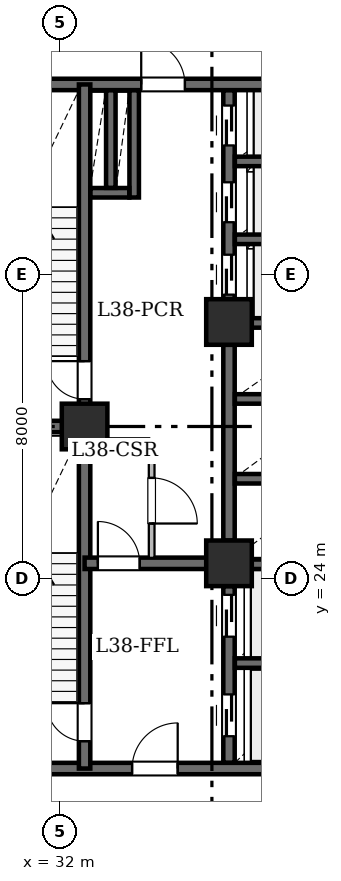
"""IFC4 building model, lengths in metres.
Left out: names, types, materials, properties, quantities, classifications, styles, units other than length and angle.
Written with IfcOpenShell. Run it as: python <this file> out.ifc"""

import sys

from ifc_helpers import new_model, si_unit, direction, frame, frame_2d, origin, origin_2d, place, context, subcontext, project, spatial, rectangle, hollow_rectangle, extrude, element, fill, save


model = new_model("IFC4")
c1 = context("Model", 3, precision=1e-05, world=origin(), true_north=direction((0.0, 1.0)))
c2 = subcontext(c1, "Body", "Model", "MODEL_VIEW")
j1 = project(units=[si_unit("LENGTHUNIT", "METRE"), si_unit("PLANEANGLEUNIT", "RADIAN")], contexts=[c1])
p1 = place(None, origin())
s1 = spatial("IfcSite", under=j1, at=p1, CompositionType="ELEMENT")
p2 = place(p1, origin())
s2 = spatial("IfcBuilding", under=s1, at=p2, CompositionType="ELEMENT")
p3 = place(p2, frame((0.0, 0.0, 150.5)))
s3 = spatial("IfcBuildingStorey", under=s2, at=p3, CompositionType="ELEMENT", Elevation=150.5)
for number, where, z_axis, x_axis in (
    (1, (32.65, 28.0, 0.0), (0.0, 0.0, 1.0), (1.0, 0.0, 0.0)),
    (2, (36.45, 24.4, 0.0), (0.0, 0.0, 1.0), (1.0, 0.0, 0.0)),
    (3, (36.45, 30.75, 0.0), (0.0, 0.0, 1.0), (1.0, 0.0, 0.0)),
):
    element("IfcColumn", number, at=place(p3, frame(where, z_axis=z_axis, x_axis=x_axis)), inside=s3, PredefinedType="COLUMN", context=c2, shape_type="SweptSolid", body=[
        extrude(hollow_rectangle(XDim=1.2, YDim=1.2, WallThickness=0.06, at=origin_2d()), origin(), (0.0, 0.0, 1.0), 5.375),
    ])
p4 = place(p3, frame((29.0, 19.0, 0.0), z_axis=(0.0, 0.0, 1.0), x_axis=(1.0, 0.0, 0.0)))
e4 = element("IfcWall", 4, at=p4, inside=s3, PredefinedType="SHEAR", context=c2, shape_type="SweptSolid", body=[
    extrude(rectangle(XDim=10.4, YDim=0.3, at=frame_2d((5.2, 0.0))), origin(), (0.0, 0.0, 1.0), 4.98),
])
p5 = place(p4, frame((4.9, 0.0, 0.0)))
e5 = element("IfcOpeningElement", 5, at=p5, cuts=e4, PredefinedType="OPENING", context=c2, shape_type="SweptSolid", body=[
    extrude(rectangle(XDim=1.2, YDim=2.15, at=frame_2d((0.6, 1.075))), frame((0.0, 0.16, 0.0), z_axis=(0.0, -1.0, 0.0), x_axis=(1.0, 0.0, 0.0)), (0.0, 0.0, 1.0), 0.32),
])
p6 = place(p3, frame((29.0, 37.0, 0.0), z_axis=(0.0, 0.0, 1.0), x_axis=(1.0, 0.0, 0.0)))
e6 = element("IfcWall", 6, at=p6, inside=s3, PredefinedType="SHEAR", context=c2, shape_type="SweptSolid", body=[
    extrude(rectangle(XDim=10.4, YDim=0.3, at=frame_2d((5.2, 0.0))), origin(), (0.0, 0.0, 1.0), 4.98),
])
p7 = place(p6, frame((5.14, 0.0, 0.0)))
e7 = element("IfcOpeningElement", 7, at=p7, cuts=e6, PredefinedType="OPENING", context=c2, shape_type="SweptSolid", body=[
    extrude(rectangle(XDim=1.15, YDim=2.2, at=frame_2d((0.575, 1.1))), frame((0.0, 0.16, 0.0), z_axis=(0.0, -1.0, 0.0), x_axis=(1.0, 0.0, 0.0)), (0.0, 0.0, 1.0), 0.32),
])
p8 = place(p3, frame((32.65, 19.0, 0.0), z_axis=(0.0, 0.0, 1.0), x_axis=(0.0, 1.0, 0.0)))
e8 = element("IfcWall", 8, at=p8, inside=s3, PredefinedType="SHEAR", context=c2, shape_type="SweptSolid", body=[
    extrude(rectangle(XDim=9.0, YDim=0.3, at=frame_2d((4.5, 0.0))), origin(), (0.0, 0.0, 1.0), 4.98),
])
p9 = place(p8, frame((0.72, 0.0, 0.0)))
e9 = element("IfcOpeningElement", 9, at=p9, cuts=e8, PredefinedType="OPENING", context=c2, shape_type="SweptSolid", body=[
    extrude(rectangle(XDim=1.0, YDim=2.15, at=frame_2d((0.5, 1.075))), frame((0.0, 0.16, 0.0), z_axis=(0.0, -1.0, 0.0), x_axis=(1.0, 0.0, 0.0)), (0.0, 0.0, 1.0), 0.32),
])
p10 = place(p3, frame((32.65, 28.0, 0.0), z_axis=(0.0, 0.0, 1.0), x_axis=(0.0, 1.0, 0.0)))
e10 = element("IfcWall", 10, at=p10, inside=s3, PredefinedType="SHEAR", context=c2, shape_type="SweptSolid", body=[
    extrude(rectangle(XDim=9.0, YDim=0.3, at=frame_2d((4.5, 0.0))), origin(), (0.0, 0.0, 1.0), 4.98),
])
p11 = place(p10, frame((0.72, 0.0, 0.0)))
e11 = element("IfcOpeningElement", 11, at=p11, cuts=e10, PredefinedType="OPENING", context=c2, shape_type="SweptSolid", body=[
    extrude(rectangle(XDim=1.0, YDim=2.15, at=frame_2d((0.5, 1.075))), frame((0.0, 0.16, 0.0), z_axis=(0.0, -1.0, 0.0), x_axis=(1.0, 0.0, 0.0)), (0.0, 0.0, 1.0), 0.32),
])
p12 = place(p3, frame((29.0, 28.0, 0.0), z_axis=(0.0, 0.0, 1.0), x_axis=(1.0, 0.0, 0.0)))
e12 = element("IfcWall", 12, at=p12, inside=s3, PredefinedType="SHEAR", context=c2, shape_type="SweptSolid", body=[
    extrude(rectangle(XDim=3.65, YDim=0.3, at=frame_2d((1.825, 0.0))), origin(), (0.0, 0.0, 1.0), 4.98),
])
p13 = place(p3, frame((32.65, 24.4, 0.0), z_axis=(0.0, 0.0, 1.0), x_axis=(1.0, 0.0, 0.0)))
e13 = element("IfcWall", 13, at=p13, inside=s3, PredefinedType="SHEAR", context=c2, shape_type="SweptSolid", body=[
    extrude(rectangle(XDim=3.8, YDim=0.3, at=frame_2d((1.9, 0.0))), origin(), (0.0, 0.0, 1.0), 4.98),
])
p14 = place(p13, frame((0.35, 0.0, 0.0)))
e14 = element("IfcOpeningElement", 14, at=p14, cuts=e13, PredefinedType="OPENING", context=c2, shape_type="SweptSolid", body=[
    extrude(rectangle(XDim=1.1, YDim=2.15, at=frame_2d((0.55, 1.075))), frame((0.0, 0.16, 0.0), z_axis=(0.0, -1.0, 0.0), x_axis=(1.0, 0.0, 0.0)), (0.0, 0.0, 1.0), 0.32),
])
p15 = place(p3, frame((36.45, 19.154, 0.0), z_axis=(0.0, 0.0, 1.0), x_axis=(0.0, 1.0, 0.0)))
e15 = element("IfcWall", 15, at=p15, inside=s3, PredefinedType="SHEAR", context=c2, shape_type="SweptSolid", body=[
    extrude(rectangle(XDim=4.646, YDim=0.3, at=frame_2d((2.323, 0.0))), origin(), (0.0, 0.0, 1.0), 4.98),
])
p16 = place(p15, frame((0.696, 0.0, 0.0)))
e16 = element("IfcOpeningElement", 16, at=p16, cuts=e15, PredefinedType="OPENING", context=c2, shape_type="SweptSolid", body=[
    extrude(rectangle(XDim=1.1, YDim=2.15, at=frame_2d((0.55, 1.075))), frame((0.0, 0.16, 0.0), z_axis=(0.0, -1.0, 0.0), x_axis=(1.0, 0.0, 0.0)), (0.0, 0.0, 1.0), 0.32),
])
p17 = place(p15, frame((3.316, 0.0, 0.0)))
e17 = element("IfcOpeningElement", 17, at=p17, cuts=e15, PredefinedType="OPENING", context=c2, shape_type="SweptSolid", body=[
    extrude(rectangle(XDim=1.1, YDim=2.15, at=frame_2d((0.55, 1.075))), frame((0.0, 0.16, 0.0), z_axis=(0.0, -1.0, 0.0), x_axis=(1.0, 0.0, 0.0)), (0.0, 0.0, 1.0), 0.32),
])
p18 = place(p3, frame((36.45, 25.0, 0.0), z_axis=(0.0, 0.0, 1.0), x_axis=(0.0, 1.0, 0.0)))
e18 = element("IfcWall", 18, at=p18, inside=s3, PredefinedType="SHEAR", context=c2, shape_type="SweptSolid", body=[
    extrude(rectangle(XDim=5.15, YDim=0.3, at=frame_2d((2.575, 0.0))), origin(), (0.0, 0.0, 1.0), 4.98),
])
p19 = place(p3, frame((36.45, 31.35, 0.0), z_axis=(0.0, 0.0, 1.0), x_axis=(0.0, 1.0, 0.0)))
e19 = element("IfcWall", 19, at=p19, inside=s3, PredefinedType="SHEAR", context=c2, shape_type="SweptSolid", body=[
    extrude(rectangle(XDim=5.496, YDim=0.3, at=frame_2d((2.748, 0.0))), origin(), (0.0, 0.0, 1.0), 4.98),
])
p20 = place(p19, frame((0.12, 0.0, 0.0)))
e20 = element("IfcOpeningElement", 20, at=p20, cuts=e19, PredefinedType="OPENING", context=c2, shape_type="SweptSolid", body=[
    extrude(rectangle(XDim=1.05, YDim=2.15, at=frame_2d((0.525, 1.075))), frame((0.0, 0.16, 0.0), z_axis=(0.0, -1.0, 0.0), x_axis=(1.0, 0.0, 0.0)), (0.0, 0.0, 1.0), 0.32),
])
p21 = place(p19, frame((2.025, 0.0, 0.0)))
e21 = element("IfcOpeningElement", 21, at=p21, cuts=e19, PredefinedType="OPENING", context=c2, shape_type="SweptSolid", body=[
    extrude(rectangle(XDim=1.05, YDim=2.15, at=frame_2d((0.525, 1.075))), frame((0.0, 0.16, 0.0), z_axis=(0.0, -1.0, 0.0), x_axis=(1.0, 0.0, 0.0)), (0.0, 0.0, 1.0), 0.32),
])
p22 = place(p19, frame((4.045, 0.0, 0.0)))
e22 = element("IfcOpeningElement", 22, at=p22, cuts=e19, PredefinedType="OPENING", context=c2, shape_type="SweptSolid", body=[
    extrude(rectangle(XDim=1.05, YDim=2.15, at=frame_2d((0.525, 1.075))), frame((0.0, 0.16, 0.0), z_axis=(0.0, -1.0, 0.0), x_axis=(1.0, 0.0, 0.0)), (0.0, 0.0, 1.0), 0.32),
])
for number, where, z_axis, x_axis in (
    (23, (36.604, 21.775, 0.0), (0.0, 0.0, 1.0), (1.0, 0.0, 0.0)),
    (24, (36.604, 24.375, 0.0), (0.0, 0.0, 1.0), (1.0, 0.0, 0.0)),
    (25, (36.604, 26.625, 0.0), (0.0, 0.0, 1.0), (1.0, 0.0, 0.0)),
    (26, (36.604, 28.725, 0.0), (0.0, 0.0, 1.0), (1.0, 0.0, 0.0)),
    (27, (36.604, 30.725, 0.0), (0.0, 0.0, 1.0), (1.0, 0.0, 0.0)),
    (28, (36.604, 32.925, 0.0), (0.0, 0.0, 1.0), (1.0, 0.0, 0.0)),
    (29, (36.604, 34.975, 0.0), (0.0, 0.0, 1.0), (1.0, 0.0, 0.0)),
):
    element("IfcWall", number, at=place(p3, frame(where, z_axis=z_axis, x_axis=x_axis)), inside=s3, PredefinedType="SHEAR", context=c2, shape_type="SweptSolid", body=[
        extrude(rectangle(XDim=2.642, YDim=0.25, at=frame_2d((1.321, 0.0))), origin(), (0.0, 0.0, 1.0), 4.98),
    ])
p23 = place(p3, frame((33.955, 34.025, 0.0), z_axis=(0.0, 0.0, 1.0), x_axis=(0.0, 1.0, 0.0)))
e30 = element("IfcWall", 30, at=p23, inside=s3, PredefinedType="SHEAR", context=c2, shape_type="SweptSolid", body=[
    extrude(rectangle(XDim=2.821, YDim=0.25, at=frame_2d((1.411, 0.0))), origin(), (0.0, 0.0, 1.0), 4.98),
])
p24 = place(p3, frame((32.804, 34.15, 0.0), z_axis=(0.0, 0.0, 1.0), x_axis=(1.0, 0.0, 0.0)))
e31 = element("IfcWall", 31, at=p24, inside=s3, PredefinedType="SHEAR", context=c2, shape_type="SweptSolid", body=[
    extrude(rectangle(XDim=1.022, YDim=0.25, at=frame_2d((0.511, 0.0))), origin(), (0.0, 0.0, 1.0), 4.98),
])
p25 = place(p3, frame((33.34, 34.279, 0.0), z_axis=(0.0, 0.0, 1.0), x_axis=(0.0, 1.0, 0.0)))
e32 = element("IfcWall", 32, at=p25, inside=s3, PredefinedType="SHEAR", context=c2, shape_type="SweptSolid", body=[
    extrude(rectangle(XDim=2.567, YDim=0.25, at=frame_2d((1.283, 0.0))), origin(), (0.0, 0.0, 1.0), 4.98),
])
p26 = place(p3, frame((32.794, 27.615, 0.0), z_axis=(0.0, 0.0, 1.0), x_axis=(1.0, 0.0, 0.0)))
e33 = element("IfcWall", 33, at=p26, inside=s3, PredefinedType="STANDARD", context=c2, shape_type="SweptSolid", body=[
    extrude(rectangle(XDim=1.556, YDim=0.15, at=frame_2d((0.778, 0.0))), origin(), (0.0, 0.0, 1.0), 4.437),
])
p27 = place(p3, frame((34.415, 27.55, 0.0), z_axis=(0.0, 0.0, 1.0), x_axis=(0.0, -1.0, 0.0)))
e34 = element("IfcWall", 34, at=p27, inside=s3, PredefinedType="STANDARD", context=c2, shape_type="SweptSolid", body=[
    extrude(rectangle(XDim=3.006, YDim=0.15, at=frame_2d((1.503, 0.0))), origin(), (0.0, 0.0, 1.0), 4.98),
])
p28 = place(p27, frame((0.903, 0.0, 0.0)))
e35 = element("IfcOpeningElement", 35, at=p28, cuts=e34, PredefinedType="OPENING", context=c2, shape_type="SweptSolid", body=[
    extrude(rectangle(XDim=1.2, YDim=2.15, at=frame_2d((0.6, 1.075))), frame((0.0, 0.085, 0.0), z_axis=(0.0, -1.0, 0.0), x_axis=(1.0, 0.0, 0.0)), (0.0, 0.0, 1.0), 0.17),
])
p29 = place(p9, origin())
e36 = element("IfcDoor", 36, at=p29, inside=s3, OperationType="SINGLE_SWING_RIGHT", PredefinedType="DOOR", context=c2, shape_type="SweptSolid", body=[
    extrude(rectangle(XDim=1.0, YDim=2.15, at=frame_2d((0.5, 1.075))), frame((0.0, 0.025, 0.0), z_axis=(0.0, -1.0, 0.0), x_axis=(1.0, 0.0, 0.0)), (0.0, 0.0, 1.0), 0.05),
])
fill(e9, e36)
p30 = place(p11, origin())
e37 = element("IfcDoor", 37, at=p30, inside=s3, OperationType="SINGLE_SWING_RIGHT", PredefinedType="DOOR", context=c2, shape_type="SweptSolid", body=[
    extrude(rectangle(XDim=1.0, YDim=2.15, at=frame_2d((0.5, 1.075))), frame((0.0, 0.025, 0.0), z_axis=(0.0, -1.0, 0.0), x_axis=(1.0, 0.0, 0.0)), (0.0, 0.0, 1.0), 0.05),
])
fill(e11, e37)
p31 = place(p14, origin())
e38 = element("IfcDoor", 38, at=p31, inside=s3, OperationType="SINGLE_SWING_LEFT", PredefinedType="DOOR", context=c2, shape_type="SweptSolid", body=[
    extrude(rectangle(XDim=1.1, YDim=2.15, at=frame_2d((0.55, 1.075))), frame((0.0, 0.025, 0.0), z_axis=(0.0, -1.0, 0.0), x_axis=(1.0, 0.0, 0.0)), (0.0, 0.0, 1.0), 0.05),
])
fill(e14, e38)
p32 = place(p5, origin())
e39 = element("IfcDoor", 39, at=p32, inside=s3, OperationType="SINGLE_SWING_RIGHT", PredefinedType="DOOR", context=c2, shape_type="SweptSolid", body=[
    extrude(rectangle(XDim=1.2, YDim=2.15, at=frame_2d((0.6, 1.075))), frame((0.0, 0.025, 0.0), z_axis=(0.0, -1.0, 0.0), x_axis=(1.0, 0.0, 0.0)), (0.0, 0.0, 1.0), 0.05),
])
fill(e5, e39)
p33 = place(p7, origin())
e40 = element("IfcDoor", 40, at=p33, inside=s3, OperationType="SINGLE_SWING_LEFT", PredefinedType="DOOR", context=c2, shape_type="SweptSolid", body=[
    extrude(rectangle(XDim=1.15, YDim=2.2, at=frame_2d((0.575, 1.1))), frame((0.0, 0.025, 0.0), z_axis=(0.0, -1.0, 0.0), x_axis=(1.0, 0.0, 0.0)), (0.0, 0.0, 1.0), 0.05),
])
fill(e7, e40)
p34 = place(p16, origin())
e41 = element("IfcDoor", 41, at=p34, inside=s3, OperationType="SLIDING_TO_LEFT", PredefinedType="DOOR", context=c2, shape_type="SweptSolid", body=[
    extrude(rectangle(XDim=1.1, YDim=2.15, at=frame_2d((0.55, 1.075))), frame((0.0, 0.025, 0.0), z_axis=(0.0, -1.0, 0.0), x_axis=(1.0, 0.0, 0.0)), (0.0, 0.0, 1.0), 0.05),
])
fill(e16, e41)
p35 = place(p17, origin())
e42 = element("IfcDoor", 42, at=p35, inside=s3, OperationType="SLIDING_TO_LEFT", PredefinedType="DOOR", context=c2, shape_type="SweptSolid", body=[
    extrude(rectangle(XDim=1.1, YDim=2.15, at=frame_2d((0.55, 1.075))), frame((0.0, 0.025, 0.0), z_axis=(0.0, -1.0, 0.0), x_axis=(1.0, 0.0, 0.0)), (0.0, 0.0, 1.0), 0.05),
])
fill(e17, e42)
p36 = place(p20, origin())
e43 = element("IfcDoor", 43, at=p36, inside=s3, OperationType="SLIDING_TO_LEFT", PredefinedType="DOOR", context=c2, shape_type="SweptSolid", body=[
    extrude(rectangle(XDim=1.05, YDim=2.15, at=frame_2d((0.525, 1.075))), frame((0.0, 0.025, 0.0), z_axis=(0.0, -1.0, 0.0), x_axis=(1.0, 0.0, 0.0)), (0.0, 0.0, 1.0), 0.05),
])
fill(e20, e43)
p37 = place(p21, origin())
e44 = element("IfcDoor", 44, at=p37, inside=s3, OperationType="SLIDING_TO_LEFT", PredefinedType="DOOR", context=c2, shape_type="SweptSolid", body=[
    extrude(rectangle(XDim=1.05, YDim=2.15, at=frame_2d((0.525, 1.075))), frame((0.0, 0.025, 0.0), z_axis=(0.0, -1.0, 0.0), x_axis=(1.0, 0.0, 0.0)), (0.0, 0.0, 1.0), 0.05),
])
fill(e21, e44)
p38 = place(p22, origin())
e45 = element("IfcDoor", 45, at=p38, inside=s3, OperationType="SLIDING_TO_LEFT", PredefinedType="DOOR", context=c2, shape_type="SweptSolid", body=[
    extrude(rectangle(XDim=1.05, YDim=2.15, at=frame_2d((0.525, 1.075))), frame((0.0, 0.025, 0.0), z_axis=(0.0, -1.0, 0.0), x_axis=(1.0, 0.0, 0.0)), (0.0, 0.0, 1.0), 0.05),
])
fill(e22, e45)
p39 = place(p28, origin())
e46 = element("IfcDoor", 46, at=p39, inside=s3, OperationType="SINGLE_SWING_RIGHT", PredefinedType="DOOR", context=c2, shape_type="SweptSolid", body=[
    extrude(rectangle(XDim=1.2, YDim=2.15, at=frame_2d((0.6, 1.075))), frame((0.0, 0.025, 0.0), z_axis=(0.0, -1.0, 0.0), x_axis=(1.0, 0.0, 0.0)), (0.0, 0.0, 1.0), 0.05),
])
fill(e35, e46)
save(model, sys.argv[1])
